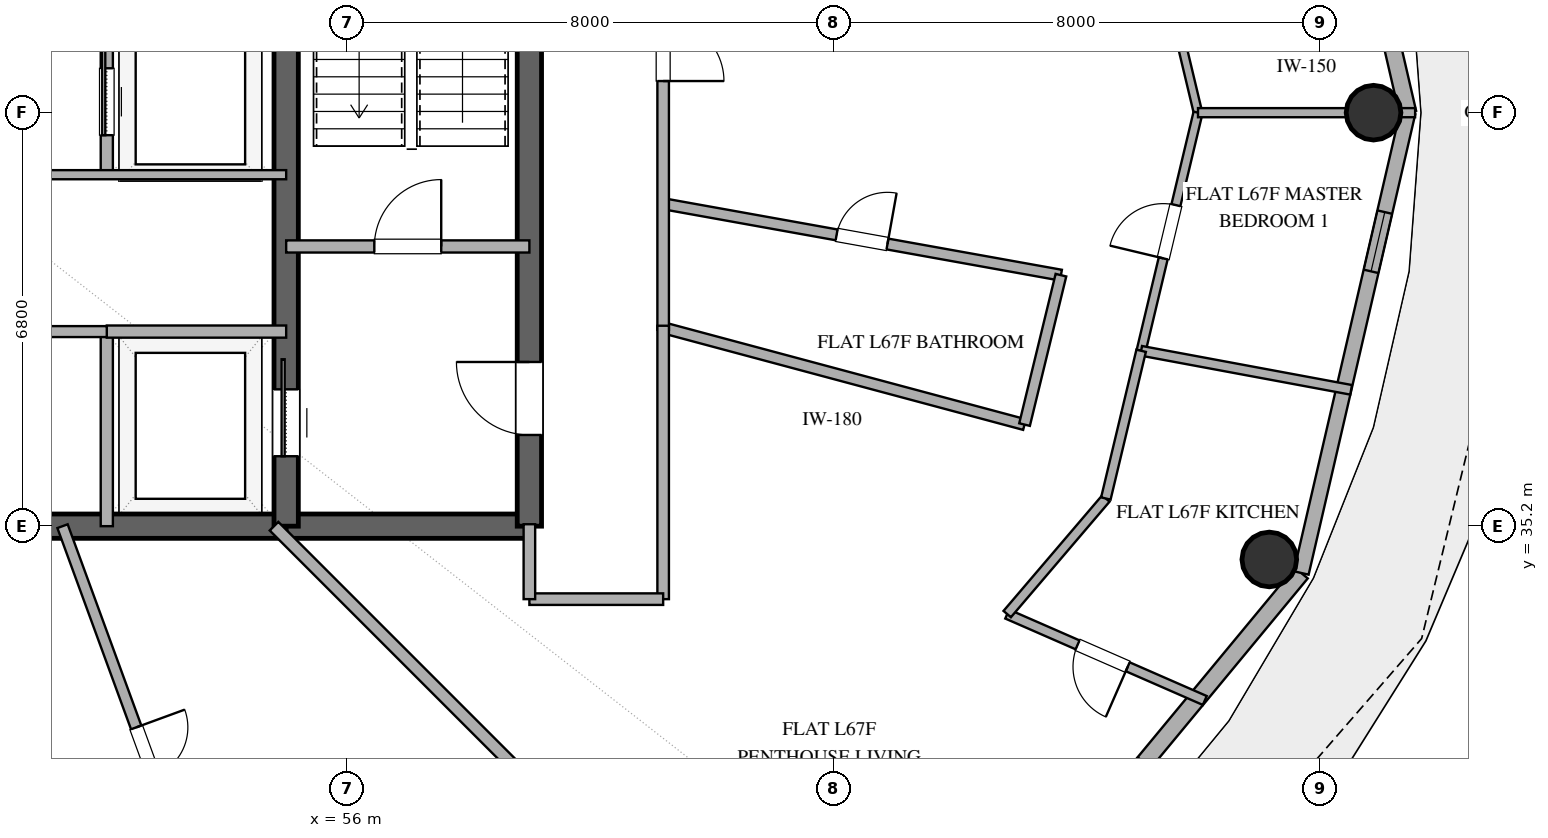
"""IFC4 building model, lengths in metres.
Left out: names, types, materials, properties, quantities, classifications, styles, units other than length and angle.
Written with IfcOpenShell. Run it as: python <this file> out.ifc"""

import sys

from ifc_helpers import new_model, si_unit, direction, frame, frame_2d, origin, origin_2d, place, context, subcontext, project, spatial, rectangle, hollow_circle, extrude, element, fill, save


model = new_model("IFC4")
c1 = context("Model", 3, precision=1e-05, world=origin(), true_north=direction((0.0, 1.0)))
c2 = subcontext(c1, "Body", "Model", "MODEL_VIEW")
j1 = project(units=[si_unit("LENGTHUNIT", "METRE"), si_unit("PLANEANGLEUNIT", "RADIAN")], contexts=[c1])
p1 = place(None, origin())
s1 = spatial("IfcSite", under=j1, at=p1, CompositionType="ELEMENT")
p2 = place(p1, origin())
s2 = spatial("IfcBuilding", under=s1, at=p2, CompositionType="ELEMENT")
p3 = place(p2, frame((0.0, 0.0, 262.2)))
s3 = spatial("IfcBuildingStorey", under=s2, at=p3, CompositionType="ELEMENT", Elevation=262.2)
p4 = place(p3, frame((41.0, 35.2, 0.0), z_axis=(0.0, 0.0, 1.0), x_axis=(1.0, 0.0, 0.0)))
e1 = element("IfcWall", 1, at=p4, inside=s3, PredefinedType="SHEAR", context=c2, shape_type="SweptSolid", body=[
    extrude(rectangle(XDim=14.0, YDim=0.4, at=frame_2d((7.0, 0.0))), origin(), (0.0, 0.0, 1.0), 3.37),
])
p5 = place(p4, frame((6.1, 0.0, 0.0)))
e2 = element("IfcOpeningElement", 2, at=p5, cuts=e1, PredefinedType="OPENING", context=c2, shape_type="SweptSolid", body=[
    extrude(rectangle(XDim=1.8, YDim=2.25, at=frame_2d((0.9, 1.125))), frame((0.0, 0.21, 0.0), z_axis=(0.0, -1.0, 0.0), x_axis=(1.0, 0.0, 0.0)), (0.0, 0.0, 1.0), 0.42),
])
p6 = place(p3, frame((55.0, 35.2, 0.0), z_axis=(0.0, 0.0, 1.0), x_axis=(1.0, 0.0, 0.0)))
e3 = element("IfcWall", 3, at=p6, inside=s3, PredefinedType="SHEAR", context=c2, shape_type="SweptSolid", body=[
    extrude(rectangle(XDim=4.0, YDim=0.4, at=frame_2d((2.0, 0.0))), origin(), (0.0, 0.0, 1.0), 3.37),
])
p7 = place(p3, frame((59.0, 35.2, 0.0), z_axis=(0.0, 0.0, 1.0), x_axis=(0.0, 1.0, 0.0)))
e4 = element("IfcWall", 4, at=p7, inside=s3, PredefinedType="SHEAR", context=c2, shape_type="SweptSolid", body=[
    extrude(rectangle(XDim=13.6, YDim=0.4, at=frame_2d((6.8, 0.0))), origin(), (0.0, 0.0, 1.0), 3.37),
])
p8 = place(p7, frame((1.5, 0.0, 0.0)))
e5 = element("IfcOpeningElement", 5, at=p8, cuts=e4, PredefinedType="OPENING", context=c2, shape_type="SweptSolid", body=[
    extrude(rectangle(XDim=1.2, YDim=2.15, at=frame_2d((0.6, 1.075))), frame((0.0, 0.21, 0.0), z_axis=(0.0, -1.0, 0.0), x_axis=(1.0, 0.0, 0.0)), (0.0, 0.0, 1.0), 0.42),
])
p9 = place(p3, frame((55.0, 35.2, 0.0), z_axis=(0.0, 0.0, 1.0), x_axis=(0.0, 1.0, 0.0)))
e6 = element("IfcWall", 6, at=p9, inside=s3, PredefinedType="SHEAR", context=c2, shape_type="SweptSolid", body=[
    extrude(rectangle(XDim=13.6, YDim=0.4, at=frame_2d((6.8, 0.0))), origin(), (0.0, 0.0, 1.0), 3.37),
])
p10 = place(p9, frame((1.15, 0.0, 0.0)))
e7 = element("IfcOpeningElement", 7, at=p10, cuts=e6, PredefinedType="OPENING", context=c2, shape_type="SweptSolid", body=[
    extrude(rectangle(XDim=1.1, YDim=2.2, at=frame_2d((0.55, 1.1))), frame((0.0, 0.21, 0.0), z_axis=(0.0, -1.0, 0.0), x_axis=(1.0, 0.0, 0.0)), (0.0, 0.0, 1.0), 0.42),
])
for number, where, z_axis, x_axis in (
    (8, (72.883, 42.0, 0.0), (0.0, 0.0, 1.0), (1.0, 0.0, 0.0)),
    (9, (71.169, 34.653, 0.0), (0.0, 0.0, 1.0), (1.0, 0.0, 0.0)),
):
    element("IfcColumn", number, at=place(p3, frame(where, z_axis=z_axis, x_axis=x_axis)), inside=s3, PredefinedType="COLUMN", context=c2, shape_type="SweptSolid", body=[
        extrude(hollow_circle(Radius=0.45, WallThickness=0.025, at=origin_2d()), origin(), (0.0, 0.0, 1.0), 3.37),
    ])
p11 = place(p3, frame((73.447, 42.0, 0.0), z_axis=(0.0, 0.0, 1.0), x_axis=(-0.225635078214, 0.974211892495, 0.0)))
e10 = element("IfcWall", 10, at=p11, inside=s3, PredefinedType="SOLIDWALL", context=c2, shape_type="SweptSolid", body=[
    extrude(rectangle(XDim=7.77, YDim=0.28, at=frame_2d((3.885, 0.0))), origin(), (0.0, 0.0, 1.0), 3.37),
])
p12 = place(p11, frame((5.192, 0.0, 0.0)))
e11 = element("IfcOpeningElement", 11, at=p12, cuts=e10, PredefinedType="OPENING", context=c2, shape_type="SweptSolid", body=[
    extrude(rectangle(XDim=1.05, YDim=2.2, at=frame_2d((0.525, 1.1))), frame((0.0, 0.15, 0.0), z_axis=(0.0, -1.0, 0.0), x_axis=(1.0, 0.0, 0.0)), (0.0, 0.0, 1.0), 0.3),
])
p13 = place(p3, frame((66.383, 28.013, 0.0), z_axis=(0.0, 0.0, 1.0), x_axis=(0.63761509934, 0.770355103243, 0.0)))
e12 = element("IfcWall", 12, at=p13, inside=s3, PredefinedType="SOLIDWALL", context=c2, shape_type="SweptSolid", body=[
    extrude(rectangle(XDim=8.33, YDim=0.28, at=frame_2d((4.165, 0.0))), origin(), (0.0, 0.0, 1.0), 3.37),
])
p14 = place(p13, frame((2.63, 0.0, 0.85)))
e13 = element("IfcOpeningElement", 13, at=p14, cuts=e12, PredefinedType="OPENING", context=c2, shape_type="SweptSolid", body=[
    extrude(rectangle(XDim=1.65, YDim=2.0, at=frame_2d((0.825, 1.0))), frame((0.0, 0.15, 0.0), z_axis=(0.0, -1.0, 0.0), x_axis=(1.0, 0.0, 0.0)), (0.0, 0.0, 1.0), 0.3),
])
p15 = place(p3, frame((71.694, 34.43, 0.0), z_axis=(0.0, 0.0, 1.0), x_axis=(0.225635078214, 0.974211892495, 0.0)))
e14 = element("IfcWall", 14, at=p15, inside=s3, PredefinedType="SOLIDWALL", context=c2, shape_type="SweptSolid", body=[
    extrude(rectangle(XDim=7.77, YDim=0.25, at=frame_2d((3.885, 0.0))), origin(), (0.0, 0.0, 1.0), 3.37),
])
p16 = place(p15, frame((5.091, 0.0, 1.42)))
e15 = element("IfcOpeningElement", 15, at=p16, cuts=e14, PredefinedType="OPENING", context=c2, shape_type="SweptSolid", body=[
    extrude(rectangle(XDim=1.0, YDim=1.05, at=frame_2d((0.5, 0.525))), frame((0.0, 0.135, 0.0), z_axis=(0.0, -1.0, 0.0), x_axis=(1.0, 0.0, 0.0)), (0.0, 0.0, 1.0), 0.27),
])
p17 = place(p3, frame((55.0, 39.8, 0.0), z_axis=(0.0, 0.0, 1.0), x_axis=(1.0, 0.0, 0.0)))
e16 = element("IfcWall", 16, at=p17, inside=s3, PredefinedType="SOLIDWALL", context=c2, shape_type="SweptSolid", body=[
    extrude(rectangle(XDim=4.0, YDim=0.2, at=frame_2d((2.0, 0.0))), origin(), (0.0, 0.0, 1.0), 2.73),
])
p18 = place(p17, frame((1.45, 0.0, 0.0)))
e17 = element("IfcOpeningElement", 17, at=p18, cuts=e16, PredefinedType="OPENING", context=c2, shape_type="SweptSolid", body=[
    extrude(rectangle(XDim=1.1, YDim=2.15, at=frame_2d((0.55, 1.075))), frame((0.0, 0.11, 0.0), z_axis=(0.0, -1.0, 0.0), x_axis=(1.0, 0.0, 0.0)), (0.0, 0.0, 1.0), 0.22),
])
p19 = place(p3, frame((52.05, 35.2, 0.0), z_axis=(0.0, 0.0, 1.0), x_axis=(0.0, 1.0, 0.0)))
e18 = element("IfcWall", 18, at=p19, inside=s3, PredefinedType="SOLIDWALL", context=c2, shape_type="SweptSolid", body=[
    extrude(rectangle(XDim=3.2, YDim=0.2, at=frame_2d((1.6, 0.0))), origin(), (0.0, 0.0, 1.0), 2.73),
])
p20 = place(p3, frame((52.05, 38.4, 0.0), z_axis=(0.0, 0.0, 1.0), x_axis=(1.0, 0.0, 0.0)))
e19 = element("IfcWall", 19, at=p20, inside=s3, PredefinedType="SOLIDWALL", context=c2, shape_type="SweptSolid", body=[
    extrude(rectangle(XDim=2.95, YDim=0.2, at=frame_2d((1.475, 0.0))), origin(), (0.0, 0.0, 1.0), 2.73),
])
p21 = place(p3, frame((52.05, 40.98, 0.0), z_axis=(0.0, 0.0, 1.0), x_axis=(0.0, 1.0, 0.0)))
e20 = element("IfcWall", 20, at=p21, inside=s3, PredefinedType="SOLIDWALL", context=c2, shape_type="SweptSolid", body=[
    extrude(rectangle(XDim=7.82, YDim=0.2, at=frame_2d((3.91, 0.0))), origin(), (0.0, 0.0, 1.0), 2.73),
])
p22 = place(p21, frame((0.65, 0.0, 0.0)))
e21 = element("IfcOpeningElement", 21, at=p22, cuts=e20, PredefinedType="OPENING", context=c2, shape_type="SweptSolid", body=[
    extrude(rectangle(XDim=1.1, YDim=2.2, at=frame_2d((0.55, 1.1))), frame((0.0, 0.11, 0.0), z_axis=(0.0, -1.0, 0.0), x_axis=(1.0, 0.0, 0.0)), (0.0, 0.0, 1.0), 0.22),
])
p23 = place(p21, frame((3.05, 0.0, 0.0)))
e22 = element("IfcOpeningElement", 22, at=p23, cuts=e20, PredefinedType="OPENING", context=c2, shape_type="SweptSolid", body=[
    extrude(rectangle(XDim=1.1, YDim=2.2, at=frame_2d((0.55, 1.1))), frame((0.0, 0.11, 0.0), z_axis=(0.0, -1.0, 0.0), x_axis=(1.0, 0.0, 0.0)), (0.0, 0.0, 1.0), 0.22),
])
p24 = place(p21, frame((5.6, 0.0, 0.0)))
e23 = element("IfcOpeningElement", 23, at=p24, cuts=e20, PredefinedType="OPENING", context=c2, shape_type="SweptSolid", body=[
    extrude(rectangle(XDim=1.2, YDim=2.2, at=frame_2d((0.6, 1.1))), frame((0.0, 0.11, 0.0), z_axis=(0.0, -1.0, 0.0), x_axis=(1.0, 0.0, 0.0)), (0.0, 0.0, 1.0), 0.22),
])
p25 = place(p3, frame((49.5, 40.98, 0.0), z_axis=(0.0, 0.0, 1.0), x_axis=(1.0, 0.0, 0.0)))
e24 = element("IfcWall", 24, at=p25, inside=s3, PredefinedType="PARTITIONING", context=c2, shape_type="SweptSolid", body=[
    extrude(rectangle(XDim=5.5, YDim=0.15, at=frame_2d((2.75, 0.0))), origin(), (0.0, 0.0, 1.0), 2.73),
])
p26 = place(p3, frame((49.2, 38.4, 0.0), z_axis=(0.0, 0.0, 1.0), x_axis=(1.0, 0.0, 0.0)))
e25 = element("IfcWall", 25, at=p26, inside=s3, PredefinedType="PLUMBINGWALL", context=c2, shape_type="SweptSolid", body=[
    extrude(rectangle(XDim=2.85, YDim=0.18, at=frame_2d((1.425, 0.0))), origin(), (0.0, 0.0, 1.0), 2.73),
])
p27 = place(p3, frame((63.561, 26.439, 0.0), z_axis=(0.0, 0.0, 1.0), x_axis=(-0.707106781187, 0.707106781187, 0.0)))
e26 = element("IfcWall", 26, at=p27, inside=s3, PredefinedType="PARTITIONING", context=c2, shape_type="SweptSolid", body=[
    extrude(rectangle(XDim=12.389, YDim=0.2, at=frame_2d((6.195, 0.0))), origin(), (0.0, 0.0, 1.0), 2.73),
])
p28 = place(p3, frame((51.322, 35.2, 0.0), z_axis=(0.0, 0.0, 1.0), x_axis=(0.343730484072, -0.939068343796, 0.0)))
e27 = element("IfcWall", 27, at=p28, inside=s3, PredefinedType="PLUMBINGWALL", context=c2, shape_type="SweptSolid", body=[
    extrude(rectangle(XDim=7.897, YDim=0.18, at=frame_2d((3.949, 0.0))), origin(), (0.0, 0.0, 1.0), 2.73),
])
p29 = place(p28, frame((3.524, 0.0, 0.0)))
e28 = element("IfcOpeningElement", 28, at=p29, cuts=e27, PredefinedType="OPENING", context=c2, shape_type="SweptSolid", body=[
    extrude(rectangle(XDim=0.85, YDim=2.1, at=frame_2d((0.425, 1.05))), frame((0.0, 0.1, 0.0), z_axis=(0.0, -1.0, 0.0), x_axis=(1.0, 0.0, 0.0)), (0.0, 0.0, 1.0), 0.2),
])
p30 = place(p3, frame((61.2, 40.503, 0.0), z_axis=(0.0, 0.0, 1.0), x_axis=(0.984255481107, -0.176751656034, 0.0)))
e29 = element("IfcWall", 29, at=p30, inside=s3, PredefinedType="PLUMBINGWALL", context=c2, shape_type="SweptSolid", body=[
    extrude(rectangle(XDim=6.647, YDim=0.18, at=frame_2d((3.323, 0.0))), origin(), (0.0, 0.0, 1.0), 2.73),
])
p31 = place(p30, frame((2.898, 0.0, 0.0)))
e30 = element("IfcOpeningElement", 30, at=p31, cuts=e29, PredefinedType="OPENING", context=c2, shape_type="SweptSolid", body=[
    extrude(rectangle(XDim=0.85, YDim=2.1, at=frame_2d((0.425, 1.05))), frame((0.0, 0.1, 0.0), z_axis=(0.0, -1.0, 0.0), x_axis=(1.0, 0.0, 0.0)), (0.0, 0.0, 1.0), 0.2),
])
p32 = place(p3, frame((67.144, 36.871, 0.0), z_axis=(0.0, 0.0, 1.0), x_axis=(-0.965930696626, 0.258800868073, 0.0)))
e31 = element("IfcWall", 31, at=p32, inside=s3, PredefinedType="PLUMBINGWALL", context=c2, shape_type="SweptSolid", body=[
    extrude(rectangle(XDim=6.154, YDim=0.18, at=frame_2d((3.077, 0.0))), origin(), (0.0, 0.0, 1.0), 2.73),
])
p33 = place(p3, frame((51.892, 27.477, 0.0), z_axis=(0.0, 0.0, 1.0), x_axis=(-0.258831810373, 0.965922405755, 0.0)))
e32 = element("IfcWall", 32, at=p33, inside=s3, PredefinedType="PLUMBINGWALL", context=c2, shape_type="SweptSolid", body=[
    extrude(rectangle(XDim=5.822, YDim=0.18, at=frame_2d((2.911, 0.0))), origin(), (0.0, 0.0, 1.0), 2.73),
])
p34 = place(p3, frame((68.673, 47.539, 0.0), z_axis=(0.0, 0.0, 1.0), x_axis=(0.232304342064, -0.972643147644, 0.0)))
e33 = element("IfcWall", 33, at=p34, inside=s3, PredefinedType="PARTITIONING", context=c2, shape_type="SweptSolid", body=[
    extrude(rectangle(XDim=5.695, YDim=0.14, at=frame_2d((2.848, 0.0))), origin(), (0.0, 0.0, 1.0), 2.73),
])
p35 = place(p34, frame((2.398, 0.0, 0.0)))
e34 = element("IfcOpeningElement", 34, at=p35, cuts=e33, PredefinedType="OPENING", context=c2, shape_type="SweptSolid", body=[
    extrude(rectangle(XDim=0.9, YDim=2.1, at=frame_2d((0.45, 1.05))), frame((0.0, 0.08, 0.0), z_axis=(0.0, -1.0, 0.0), x_axis=(1.0, 0.0, 0.0)), (0.0, 0.0, 1.0), 0.16),
])
p36 = place(p3, frame((61.2, 50.9, 0.0), z_axis=(0.0, 0.0, 1.0), x_axis=(0.0, -1.0, 0.0)))
e35 = element("IfcWall", 35, at=p36, inside=s3, PredefinedType="PARTITIONING", context=c2, shape_type="SweptSolid", body=[
    extrude(rectangle(XDim=12.47, YDim=0.19, at=frame_2d((6.235, 0.0))), origin(), (0.0, 0.0, 1.0), 2.73),
])
p37 = place(p36, frame((2.198, 0.0, 0.0)))
e36 = element("IfcOpeningElement", 36, at=p37, cuts=e35, PredefinedType="OPENING", context=c2, shape_type="SweptSolid", body=[
    extrude(rectangle(XDim=1.0, YDim=2.2, at=frame_2d((0.5, 1.1))), frame((0.0, 0.105, 0.0), z_axis=(0.0, -1.0, 0.0), x_axis=(1.0, 0.0, 0.0)), (0.0, 0.0, 1.0), 0.21),
])
p38 = place(p36, frame((7.38, 0.0, 0.0)))
e37 = element("IfcOpeningElement", 37, at=p38, cuts=e35, PredefinedType="OPENING", context=c2, shape_type="SweptSolid", body=[
    extrude(rectangle(XDim=1.0, YDim=2.2, at=frame_2d((0.5, 1.1))), frame((0.0, 0.105, 0.0), z_axis=(0.0, -1.0, 0.0), x_axis=(1.0, 0.0, 0.0)), (0.0, 0.0, 1.0), 0.21),
])
p39 = place(p3, frame((61.2, 38.496, 0.0), z_axis=(0.0, 0.0, 1.0), x_axis=(0.0, -1.0, 0.0)))
e38 = element("IfcWall", 38, at=p39, inside=s3, PredefinedType="PARTITIONING", context=c2, shape_type="SweptSolid", body=[
    extrude(rectangle(XDim=4.496, YDim=0.19, at=frame_2d((2.248, 0.0))), origin(), (0.0, 0.0, 1.0), 2.73),
])
p40 = place(p3, frame((69.061, 38.084, 0.0), z_axis=(0.0, 0.0, 1.0), x_axis=(0.232333768072, 0.972636119118, 0.0)))
e39 = element("IfcWall", 39, at=p40, inside=s3, PredefinedType="PARTITIONING", context=c2, shape_type="SweptSolid", body=[
    extrude(rectangle(XDim=4.026, YDim=0.15, at=frame_2d((2.013, 0.0))), origin(), (0.0, 0.0, 1.0), 2.73),
])
p41 = place(p40, frame((1.563, 0.0, 0.0)))
e40 = element("IfcOpeningElement", 40, at=p41, cuts=e39, PredefinedType="OPENING", context=c2, shape_type="SweptSolid", body=[
    extrude(rectangle(XDim=0.9, YDim=2.1, at=frame_2d((0.45, 1.05))), frame((0.0, 0.085, 0.0), z_axis=(0.0, -1.0, 0.0), x_axis=(1.0, 0.0, 0.0)), (0.0, 0.0, 1.0), 0.17),
])
p42 = place(p3, frame((69.996, 42.0, 0.0), z_axis=(0.0, 0.0, 1.0), x_axis=(1.0, 0.0, 0.0)))
e41 = element("IfcWall", 41, at=p42, inside=s3, PredefinedType="PARTITIONING", context=c2, shape_type="SweptSolid", body=[
    extrude(rectangle(XDim=3.571, YDim=0.15, at=frame_2d((1.785, 0.0))), origin(), (0.0, 0.0, 1.0), 2.73),
])
p43 = place(p3, frame((70.108, 32.333, 0.0), z_axis=(0.0, 0.0, 1.0), x_axis=(-0.916236311754, 0.400638267048, 0.0)))
e42 = element("IfcWall", 42, at=p43, inside=s3, PredefinedType="PLUMBINGWALL", context=c2, shape_type="SweptSolid", body=[
    extrude(rectangle(XDim=3.547, YDim=0.16, at=frame_2d((1.773, 0.0))), origin(), (0.0, 0.0, 1.0), 2.73),
])
p44 = place(p43, frame((1.383, 0.0, 0.0)))
e43 = element("IfcOpeningElement", 43, at=p44, cuts=e42, PredefinedType="OPENING", context=c2, shape_type="SweptSolid", body=[
    extrude(rectangle(XDim=0.9, YDim=2.1, at=frame_2d((0.45, 1.05))), frame((0.0, 0.09, 0.0), z_axis=(0.0, -1.0, 0.0), x_axis=(1.0, 0.0, 0.0)), (0.0, 0.0, 1.0), 0.18),
])
p45 = place(p3, frame((72.514, 37.442, 0.0), z_axis=(0.0, 0.0, 1.0), x_axis=(-0.983150389917, 0.182798552526, 0.0)))
e44 = element("IfcWall", 44, at=p45, inside=s3, PredefinedType="PLUMBINGWALL", context=c2, shape_type="SweptSolid", body=[
    extrude(rectangle(XDim=3.512, YDim=0.16, at=frame_2d((1.756, 0.0))), origin(), (0.0, 0.0, 1.0), 2.73),
])
p46 = place(p3, frame((67.742, 39.328, 0.0), z_axis=(0.0, 0.0, 1.0), x_axis=(-0.236511691524, -0.971628642935, 0.0)))
e45 = element("IfcWall", 45, at=p46, inside=s3, PredefinedType="PLUMBINGWALL", context=c2, shape_type="SweptSolid", body=[
    extrude(rectangle(XDim=2.529, YDim=0.18, at=frame_2d((1.265, 0.0))), origin(), (0.0, 0.0, 1.0), 2.73),
])
p47 = place(p3, frame((66.858, 33.754, 0.0), z_axis=(0.0, 0.0, 1.0), x_axis=(0.649277541607, 0.760551559044, 0.0)))
e46 = element("IfcWall", 46, at=p47, inside=s3, PredefinedType="PLUMBINGWALL", context=c2, shape_type="SweptSolid", body=[
    extrude(rectangle(XDim=2.499, YDim=0.16, at=frame_2d((1.25, 0.0))), origin(), (0.0, 0.0, 1.0), 2.73),
])
p48 = place(p3, frame((68.481, 35.655, 0.0), z_axis=(0.0, 0.0, 1.0), x_axis=(0.232241557879, 0.972658140764, 0.0)))
e47 = element("IfcWall", 47, at=p48, inside=s3, PredefinedType="PLUMBINGWALL", context=c2, shape_type="SweptSolid", body=[
    extrude(rectangle(XDim=2.498, YDim=0.16, at=frame_2d((1.249, 0.0))), origin(), (0.0, 0.0, 1.0), 2.73),
])
p49 = place(p3, frame((61.2, 34.0, 0.0), z_axis=(0.0, 0.0, 1.0), x_axis=(-1.0, 0.0, 0.0)))
e48 = element("IfcWall", 48, at=p49, inside=s3, PredefinedType="PARTITIONING", context=c2, shape_type="SweptSolid", body=[
    extrude(rectangle(XDim=2.2, YDim=0.19, at=frame_2d((1.1, 0.0))), origin(), (0.0, 0.0, 1.0), 2.73),
])
p50 = place(p3, frame((59.0, 34.0, 0.0), z_axis=(0.0, 0.0, 1.0), x_axis=(0.0, 1.0, 0.0)))
e49 = element("IfcWall", 49, at=p50, inside=s3, PredefinedType="PARTITIONING", context=c2, shape_type="SweptSolid", body=[
    extrude(rectangle(XDim=1.232, YDim=0.19, at=frame_2d((0.616, 0.0))), origin(), (0.0, 0.0, 1.0), 2.73),
])
p51 = place(p16, origin())
e50 = element("IfcWindow", 50, at=p51, inside=s3, PartitioningType="SINGLE_PANEL", PredefinedType="WINDOW", context=c2, shape_type="SweptSolid", body=[
    extrude(rectangle(XDim=1.0, YDim=1.05, at=frame_2d((0.5, 0.525))), frame((0.0, 0.03, 0.0), z_axis=(0.0, -1.0, 0.0), x_axis=(1.0, 0.0, 0.0)), (0.0, 0.0, 1.0), 0.06),
])
fill(e15, e50)
p52 = place(p10, origin())
e51 = element("IfcDoor", 51, at=p52, inside=s3, OperationType="SLIDING_TO_RIGHT", PredefinedType="DOOR", context=c2, shape_type="SweptSolid", body=[
    extrude(rectangle(XDim=1.1, YDim=2.2, at=frame_2d((0.55, 1.1))), frame((0.0, 0.025, 0.0), z_axis=(0.0, -1.0, 0.0), x_axis=(1.0, 0.0, 0.0)), (0.0, 0.0, 1.0), 0.05),
])
fill(e7, e51)
p53 = place(p8, origin())
e52 = element("IfcDoor", 52, at=p53, inside=s3, OperationType="SINGLE_SWING_RIGHT", PredefinedType="DOOR", context=c2, shape_type="SweptSolid", body=[
    extrude(rectangle(XDim=1.2, YDim=2.15, at=frame_2d((0.6, 1.075))), frame((0.0, 0.025, 0.0), z_axis=(0.0, -1.0, 0.0), x_axis=(1.0, 0.0, 0.0)), (0.0, 0.0, 1.0), 0.05),
])
fill(e5, e52)
p54 = place(p18, origin())
e53 = element("IfcDoor", 53, at=p54, inside=s3, OperationType="SINGLE_SWING_RIGHT", PredefinedType="DOOR", context=c2, shape_type="SweptSolid", body=[
    extrude(rectangle(XDim=1.1, YDim=2.15, at=frame_2d((0.55, 1.075))), frame((0.0, 0.025, 0.0), z_axis=(0.0, -1.0, 0.0), x_axis=(1.0, 0.0, 0.0)), (0.0, 0.0, 1.0), 0.05),
])
fill(e17, e53)
p55 = place(p22, origin())
e54 = element("IfcDoor", 54, at=p55, inside=s3, OperationType="SLIDING_TO_RIGHT", PredefinedType="DOOR", context=c2, shape_type="SweptSolid", body=[
    extrude(rectangle(XDim=1.1, YDim=2.2, at=frame_2d((0.55, 1.1))), frame((0.0, 0.025, 0.0), z_axis=(0.0, -1.0, 0.0), x_axis=(1.0, 0.0, 0.0)), (0.0, 0.0, 1.0), 0.05),
])
fill(e21, e54)
p56 = place(p29, origin())
e55 = element("IfcDoor", 55, at=p56, inside=s3, OperationType="SINGLE_SWING_LEFT", PredefinedType="DOOR", context=c2, shape_type="SweptSolid", body=[
    extrude(rectangle(XDim=0.85, YDim=2.1, at=frame_2d((0.425, 1.05))), frame((0.0, 0.025, 0.0), z_axis=(0.0, -1.0, 0.0), x_axis=(1.0, 0.0, 0.0)), (0.0, 0.0, 1.0), 0.05),
])
fill(e28, e55)
p57 = place(p31, origin())
e56 = element("IfcDoor", 56, at=p57, inside=s3, OperationType="SINGLE_SWING_RIGHT", PredefinedType="DOOR", context=c2, shape_type="SweptSolid", body=[
    extrude(rectangle(XDim=0.85, YDim=2.1, at=frame_2d((0.425, 1.05))), frame((0.0, 0.025, 0.0), z_axis=(0.0, -1.0, 0.0), x_axis=(1.0, 0.0, 0.0)), (0.0, 0.0, 1.0), 0.05),
])
fill(e30, e56)
p58 = place(p38, origin())
e57 = element("IfcDoor", 57, at=p58, inside=s3, OperationType="SINGLE_SWING_RIGHT", PredefinedType="DOOR", context=c2, shape_type="SweptSolid", body=[
    extrude(rectangle(XDim=1.0, YDim=2.2, at=frame_2d((0.5, 1.1))), frame((0.0, 0.025, 0.0), z_axis=(0.0, -1.0, 0.0), x_axis=(1.0, 0.0, 0.0)), (0.0, 0.0, 1.0), 0.05),
])
fill(e37, e57)
p59 = place(p41, origin())
e58 = element("IfcDoor", 58, at=p59, inside=s3, OperationType="SINGLE_SWING_LEFT", PredefinedType="DOOR", context=c2, shape_type="SweptSolid", body=[
    extrude(rectangle(XDim=0.9, YDim=2.1, at=frame_2d((0.45, 1.05))), frame((0.0, 0.025, 0.0), z_axis=(0.0, -1.0, 0.0), x_axis=(1.0, 0.0, 0.0)), (0.0, 0.0, 1.0), 0.05),
])
fill(e40, e58)
p60 = place(p44, origin())
e59 = element("IfcDoor", 59, at=p60, inside=s3, OperationType="SINGLE_SWING_LEFT", PredefinedType="DOOR", context=c2, shape_type="SweptSolid", body=[
    extrude(rectangle(XDim=0.9, YDim=2.1, at=frame_2d((0.45, 1.05))), frame((0.0, 0.025, 0.0), z_axis=(0.0, -1.0, 0.0), x_axis=(1.0, 0.0, 0.0)), (0.0, 0.0, 1.0), 0.05),
])
fill(e43, e59)
save(model, sys.argv[1])
